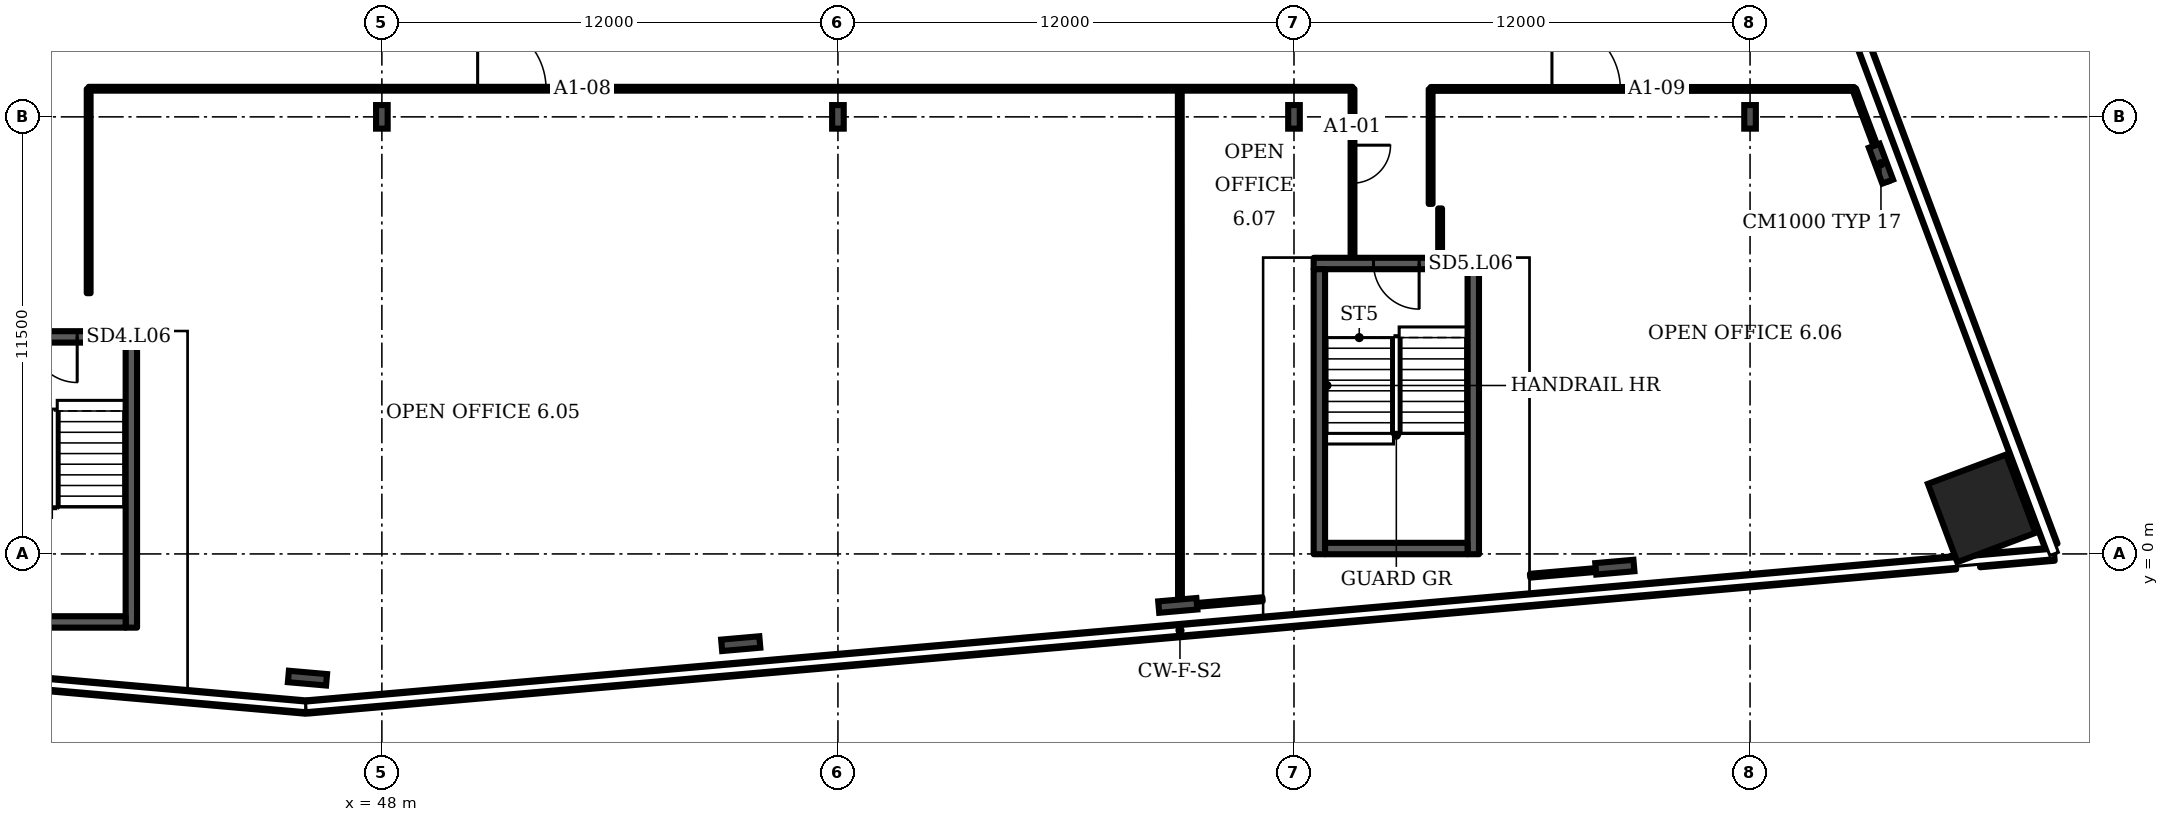
"""IFC4 building model, lengths in metres.
Left out: names, types, materials, properties, quantities, classifications, styles, units other than length and angle.
Written with IfcOpenShell. Run it as: python <this file> out.ifc"""

import sys

from ifc_helpers import new_model, si_unit, direction, frame, frame_2d, origin, origin_2d, place, context, subcontext, project, spatial, rectangle, i_section, extrude, element, fill, save


model = new_model("IFC4")
c1 = context("Model", 3, precision=1e-05, world=origin(), true_north=direction((0.0, 1.0)))
c2 = subcontext(c1, "Body", "Model", "MODEL_VIEW")
j1 = project(units=[si_unit("LENGTHUNIT", "METRE"), si_unit("PLANEANGLEUNIT", "RADIAN")], contexts=[c1])
p1 = place(None, origin())
s1 = spatial("IfcSite", under=j1, at=p1, CompositionType="ELEMENT")
p2 = place(p1, origin())
s2 = spatial("IfcBuilding", under=s1, at=p2, CompositionType="ELEMENT")
p3 = place(p2, frame((0.0, 0.0, 41.5)))
s3 = spatial("IfcBuildingStorey", under=s2, at=p3, CompositionType="ELEMENT", Elevation=41.5)
p4 = place(p3, frame((90.096, 1.2, 0.0), z_axis=(0.0, 0.0, 1.0), x_axis=(-0.351123, 0.936328, 0.0)))
e1 = element("IfcColumn", 1, at=p4, inside=s3, PredefinedType="COLUMN", context=c2, shape_type="SweptSolid", body=[
    extrude(rectangle(XDim=2.2, YDim=2.2, at=origin_2d()), origin(), (0.0, 0.0, 1.0), 3.6),
])
for number, where, z_axis, x_axis in (
    (2, (46.042, -3.268, 0.0), (0.0, 0.0, 1.0), (-0.087, -0.996, 0.0)),
    (3, (57.442, -2.361, 0.0), (0.0, 0.0, 1.0), (0.087, -0.996, 0.0)),
    (4, (68.942, -1.355, 0.0), (0.0, 0.0, 1.0), (0.087, -0.996, 0.0)),
    (5, (80.442, -0.349, 0.0), (0.0, 0.0, 1.0), (0.087, -0.996, 0.0)),
    (6, (87.445, 10.268, 0.0), (0.0, 0.0, 1.0), (0.936, 0.351, 0.0)),
):
    element("IfcColumn", number, at=place(p3, frame(where, z_axis=z_axis, x_axis=x_axis)), inside=s3, PredefinedType="COLUMN", context=c2, shape_type="SweptSolid", body=[
        extrude(i_section(OverallWidth=0.302, OverallDepth=1.008, WebThickness=0.021, FlangeThickness=0.04, FilletRadius=0.03, at=origin_2d()), origin(), (0.0, 0.0, 1.0), 3.6),
    ])
for number, where, z_axis, x_axis in (
    (7, (48.0, 11.5, 0.0), (0.0, 0.0, 1.0), (1.0, 0.0, 0.0)),
    (8, (60.0, 11.5, 0.0), (0.0, 0.0, 1.0), (1.0, 0.0, 0.0)),
    (9, (72.0, 11.5, 0.0), (0.0, 0.0, 1.0), (1.0, 0.0, 0.0)),
    (10, (84.0, 11.5, 0.0), (0.0, 0.0, 1.0), (1.0, 0.0, 0.0)),
):
    element("IfcColumn", number, at=place(p3, frame(where, z_axis=z_axis, x_axis=x_axis)), inside=s3, PredefinedType="COLUMN", context=c2, shape_type="SweptSolid", body=[
        extrude(i_section(OverallWidth=0.305, OverallDepth=0.62, WebThickness=0.021, FlangeThickness=0.04, FilletRadius=0.027, at=origin_2d()), origin(), (0.0, 0.0, 1.0), 3.6),
    ])
p5 = place(p3, frame((5.835, -0.516, 0.0), z_axis=(0.0, 0.0, 1.0), x_axis=(0.996195, -0.087152, 0.0)))
e11 = element("IfcWall", 11, at=p5, inside=s3, PredefinedType="SOLIDWALL", context=c2, shape_type="SweptSolid", body=[
    extrude(rectangle(XDim=40.333, YDim=0.35, at=frame_2d((20.167, 0.0))), origin(), (0.0, 0.0, 1.0), 1.0),
])
p6 = place(p3, frame((46.045, -4.026, 0.0), z_axis=(0.0, 0.0, 1.0), x_axis=(0.996198, 0.08716, 0.0)))
e12 = element("IfcWall", 12, at=p6, inside=s3, PredefinedType="SOLIDWALL", context=c2, shape_type="SweptSolid", body=[
    extrude(rectangle(XDim=43.529, YDim=0.35, at=frame_2d((21.764, 0.0))), origin(), (0.0, 0.0, 1.0), 1.0),
])
p7 = place(p3, frame((90.039, -0.177, 0.0), z_axis=(0.0, 0.0, 1.0), x_axis=(0.996193, 0.08717, 0.0)))
e13 = element("IfcWall", 13, at=p7, inside=s3, PredefinedType="SOLIDWALL", context=c2, shape_type="SweptSolid", body=[
    extrude(rectangle(XDim=1.969, YDim=0.35, at=frame_2d((0.984, 0.0))), origin(), (0.0, 0.0, 1.0), 1.0),
])
p8 = place(p3, frame((91.926, 0.211, 0.0), z_axis=(0.0, 0.0, 1.0), x_axis=(-0.351119, 0.93633, 0.0)))
e14 = element("IfcWall", 14, at=p8, inside=s3, PredefinedType="SOLIDWALL", context=c2, shape_type="SweptSolid", body=[
    extrude(rectangle(XDim=44.757, YDim=0.35, at=frame_2d((22.378, 0.0))), origin(), (0.0, 0.0, 1.0), 1.0),
])
p9 = place(p3, frame((37.208, 5.711, 0.0), z_axis=(0.0, 0.0, 1.0), x_axis=(1.0, 0.0, 0.0)))
e15 = element("IfcWall", 15, at=p9, inside=s3, PredefinedType="SHEAR", context=c2, shape_type="SweptSolid", body=[
    extrude(rectangle(XDim=4.35, YDim=0.3, at=frame_2d((2.175, 0.0))), origin(), (0.0, 0.0, 1.0), 3.2),
])
p10 = place(p9, frame((1.575, 0.0, 0.0)))
e16 = element("IfcOpeningElement", 16, at=p10, cuts=e15, PredefinedType="OPENING", context=c2, shape_type="SweptSolid", body=[
    extrude(rectangle(XDim=1.2, YDim=2.1, at=frame_2d((0.6, 1.05))), frame((0.0, 0.16, 0.0), z_axis=(0.0, -1.0, 0.0), x_axis=(1.0, 0.0, 0.0)), (0.0, 0.0, 1.0), 0.32),
])
p11 = place(p3, frame((72.518, 7.642, 0.0), z_axis=(0.0, 0.0, 1.0), x_axis=(1.0, 0.0, 0.0)))
e17 = element("IfcWall", 17, at=p11, inside=s3, PredefinedType="SHEAR", context=c2, shape_type="SweptSolid", body=[
    extrude(rectangle(XDim=4.35, YDim=0.3, at=frame_2d((2.175, 0.0))), origin(), (0.0, 0.0, 1.0), 3.2),
])
p12 = place(p11, frame((1.575, 0.0, 0.0)))
e18 = element("IfcOpeningElement", 18, at=p12, cuts=e17, PredefinedType="OPENING", context=c2, shape_type="SweptSolid", body=[
    extrude(rectangle(XDim=1.2, YDim=2.1, at=frame_2d((0.6, 1.05))), frame((0.0, 0.16, 0.0), z_axis=(0.0, -1.0, 0.0), x_axis=(1.0, 0.0, 0.0)), (0.0, 0.0, 1.0), 0.32),
])
p13 = place(p3, frame((40.285, 6.861, 0.0), z_axis=(0.0, 0.0, 1.0), x_axis=(0.0, 1.0, 0.0)))
e19 = element("IfcWall", 19, at=p13, inside=s3, PredefinedType="PARTITIONING", context=c2, shape_type="SweptSolid", body=[
    extrude(rectangle(XDim=5.375, YDim=0.1, at=frame_2d((2.687, 0.0))), origin(), (0.0, 0.0, 1.0), 3.2),
])
p14 = place(p3, frame((40.285, 12.24, 0.0), z_axis=(0.0, 0.0, 1.0), x_axis=(1.0, 0.0, 0.0)))
e20 = element("IfcWall", 20, at=p14, inside=s3, PredefinedType="PARTITIONING", context=c2, shape_type="SweptSolid", body=[
    extrude(rectangle(XDim=33.255, YDim=0.1, at=frame_2d((16.627, 0.0))), origin(), (0.0, 0.0, 1.0), 3.2),
])
p15 = place(p14, frame((10.235, 0.0, 0.0)))
e21 = element("IfcOpeningElement", 21, at=p15, cuts=e20, PredefinedType="OPENING", context=c2, shape_type="SweptSolid", body=[
    extrude(rectangle(XDim=1.8, YDim=2.1, at=frame_2d((0.9, 1.05))), frame((0.0, 0.06, 0.0), z_axis=(0.0, -1.0, 0.0), x_axis=(1.0, 0.0, 0.0)), (0.0, 0.0, 1.0), 0.12),
])
p16 = place(p3, frame((69.0, -1.38, 0.0), z_axis=(0.0, 0.0, 1.0), x_axis=(-0.000359, 1.000002, 0.0)))
e22 = element("IfcWall", 22, at=p16, inside=s3, PredefinedType="PARTITIONING", context=c2, shape_type="SweptSolid", body=[
    extrude(rectangle(XDim=13.615, YDim=0.1, at=frame_2d((6.808, 0.0))), origin(), (0.0, 0.0, 1.0), 3.2),
])
p17 = place(p3, frame((69.0, -1.38, 0.0), z_axis=(0.0, 0.0, 1.0), x_axis=(0.996261, 0.086427, 0.0)))
e23 = element("IfcWall", 23, at=p17, inside=s3, PredefinedType="PARTITIONING", context=c2, shape_type="SweptSolid", body=[
    extrude(rectangle(XDim=2.181, YDim=0.1, at=frame_2d((1.09, 0.0))), origin(), (0.0, 0.0, 1.0), 2.58),
])
p18 = place(p3, frame((73.54, 7.812, 0.0), z_axis=(0.0, 0.0, 1.0), x_axis=(0.0, 1.0, 0.0)))
e24 = element("IfcWall", 24, at=p18, inside=s3, PredefinedType="PARTITIONING", context=c2, shape_type="SweptSolid", body=[
    extrude(rectangle(XDim=4.423, YDim=0.1, at=frame_2d((2.211, 0.0))), origin(), (0.0, 0.0, 1.0), 3.2),
])
p19 = place(p18, frame((1.943, 0.0, 0.0)))
e25 = element("IfcOpeningElement", 25, at=p19, cuts=e24, PredefinedType="OPENING", context=c2, shape_type="SweptSolid", body=[
    extrude(rectangle(XDim=1.0, YDim=2.1, at=frame_2d((0.5, 1.05))), frame((0.0, 0.06, 0.0), z_axis=(0.0, -1.0, 0.0), x_axis=(1.0, 0.0, 0.0)), (0.0, 0.0, 1.0), 0.12),
])
p20 = place(p3, frame((75.595, 9.21, 0.0), z_axis=(0.0, 0.0, 1.0), x_axis=(0.0, 1.0, 0.0)))
e26 = element("IfcWall", 26, at=p20, inside=s3, PredefinedType="PARTITIONING", context=c2, shape_type="SweptSolid", body=[
    extrude(rectangle(XDim=3.02, YDim=0.1, at=frame_2d((1.51, 0.0))), origin(), (0.0, 0.0, 1.0), 3.2),
])
p21 = place(p3, frame((75.595, 12.235, 0.0), z_axis=(0.0, 0.0, 1.0), x_axis=(1.0, 0.0, 0.0)))
e27 = element("IfcWall", 27, at=p21, inside=s3, PredefinedType="PARTITIONING", context=c2, shape_type="SweptSolid", body=[
    extrude(rectangle(XDim=11.145, YDim=0.1, at=frame_2d((5.573, 0.0))), origin(), (0.0, 0.0, 1.0), 3.2),
])
p22 = place(p21, frame((3.192, 0.0, 0.0)))
e28 = element("IfcOpeningElement", 28, at=p22, cuts=e27, PredefinedType="OPENING", context=c2, shape_type="SweptSolid", body=[
    extrude(rectangle(XDim=1.8, YDim=2.1, at=frame_2d((0.9, 1.05))), frame((0.0, 0.06, 0.0), z_axis=(0.0, -1.0, 0.0), x_axis=(1.0, 0.0, 0.0)), (0.0, 0.0, 1.0), 0.12),
])
p23 = place(p3, frame((75.845, 7.812, 0.0), z_axis=(0.0, 0.0, 1.0), x_axis=(0.0, 1.0, 0.0)))
e29 = element("IfcWall", 29, at=p23, inside=s3, PredefinedType="PARTITIONING", context=c2, shape_type="SweptSolid", body=[
    extrude(rectangle(XDim=1.278, YDim=0.1, at=frame_2d((0.639, 0.0))), origin(), (0.0, 0.0, 1.0), 3.2),
])
p24 = place(p3, frame((78.212, -0.573, 0.0), z_axis=(0.0, 0.0, 1.0), x_axis=(0.996271, 0.08623, 0.0)))
e30 = element("IfcWall", 30, at=p24, inside=s3, PredefinedType="PARTITIONING", context=c2, shape_type="SweptSolid", body=[
    extrude(rectangle(XDim=2.296, YDim=0.1, at=frame_2d((1.148, 0.0))), origin(), (0.0, 0.0, 1.0), 2.58),
])
p25 = place(p3, frame((86.88, 11.855, 0.0), z_axis=(0.0, 0.0, 1.0), x_axis=(-0.34537, 0.938466, 0.0)))
e31 = element("IfcWall", 31, at=p25, inside=s3, PredefinedType="PARTITIONING", context=c2, shape_type="SweptSolid", body=[
    extrude(rectangle(XDim=0.405, YDim=0.1, at=frame_2d((0.203, 0.0))), origin(), (0.0, 0.0, 1.0), 2.58),
])
p26 = place(p3, frame((87.65, 9.81, 0.0), z_axis=(0.0, 0.0, 1.0), x_axis=(-0.352397, 0.935852, 0.0)))
e32 = element("IfcWall", 32, at=p26, inside=s3, PredefinedType="PARTITIONING", context=c2, shape_type="SweptSolid", body=[
    extrude(rectangle(XDim=2.185, YDim=0.1, at=frame_2d((1.093, 0.0))), origin(), (0.0, 0.0, 1.0), 2.58),
])
p27 = place(p3, frame((41.408, -1.939, 0.0), z_axis=(0.0, 0.0, 1.0), x_axis=(0.0, 1.0, 0.0)))
e33 = element("IfcWall", 33, at=p27, inside=s3, PredefinedType="SHEAR", context=c2, shape_type="SweptSolid", body=[
    extrude(rectangle(XDim=7.5, YDim=0.3, at=frame_2d((3.75, 0.0))), origin(), (0.0, 0.0, 1.0), 3.2),
])
p28 = place(p3, frame((37.508, -1.789, 0.0), z_axis=(0.0, 0.0, 1.0), x_axis=(1.0, 0.0, 0.0)))
e34 = element("IfcWall", 34, at=p28, inside=s3, PredefinedType="SHEAR", context=c2, shape_type="SweptSolid", body=[
    extrude(rectangle(XDim=3.75, YDim=0.3, at=frame_2d((1.875, 0.0))), origin(), (0.0, 0.0, 1.0), 3.2),
])
for number, where, z_axis, x_axis in (
    (35, (72.667, -0.008, 0.0), (0.0, 0.0, 1.0), (0.0, 1.0, 0.0)),
    (36, (76.718, -0.008, 0.0), (0.0, 0.0, 1.0), (0.0, 1.0, 0.0)),
):
    element("IfcWall", number, at=place(p3, frame(where, z_axis=z_axis, x_axis=x_axis)), inside=s3, PredefinedType="SHEAR", context=c2, shape_type="SweptSolid", body=[
        extrude(rectangle(XDim=7.5, YDim=0.3, at=frame_2d((3.75, 0.0))), origin(), (0.0, 0.0, 1.0), 3.2),
    ])
p29 = place(p3, frame((72.817, 0.142, 0.0), z_axis=(0.0, 0.0, 1.0), x_axis=(1.0, 0.0, 0.0)))
e37 = element("IfcWall", 37, at=p29, inside=s3, PredefinedType="SHEAR", context=c2, shape_type="SweptSolid", body=[
    extrude(rectangle(XDim=3.75, YDim=0.3, at=frame_2d((1.875, 0.0))), origin(), (0.0, 0.0, 1.0), 3.2),
])
p30 = place(p10, origin())
e38 = element("IfcDoor", 38, at=p30, inside=s3, OperationType="SINGLE_SWING_RIGHT", PredefinedType="DOOR", context=c2, shape_type="SweptSolid", body=[
    extrude(rectangle(XDim=1.2, YDim=2.1, at=frame_2d((0.6, 1.05))), frame((0.0, 0.025, 0.0), z_axis=(0.0, -1.0, 0.0), x_axis=(1.0, 0.0, 0.0)), (0.0, 0.0, 1.0), 0.05),
])
fill(e16, e38)
p31 = place(p12, origin())
e39 = element("IfcDoor", 39, at=p31, inside=s3, OperationType="SINGLE_SWING_RIGHT", PredefinedType="DOOR", context=c2, shape_type="SweptSolid", body=[
    extrude(rectangle(XDim=1.2, YDim=2.1, at=frame_2d((0.6, 1.05))), frame((0.0, 0.025, 0.0), z_axis=(0.0, -1.0, 0.0), x_axis=(1.0, 0.0, 0.0)), (0.0, 0.0, 1.0), 0.05),
])
fill(e18, e39)
p32 = place(p19, origin())
e40 = element("IfcDoor", 40, at=p32, inside=s3, OperationType="SINGLE_SWING_RIGHT", PredefinedType="DOOR", context=c2, shape_type="SweptSolid", body=[
    extrude(rectangle(XDim=1.0, YDim=2.1, at=frame_2d((0.5, 1.05))), frame((0.0, 0.025, 0.0), z_axis=(0.0, -1.0, 0.0), x_axis=(1.0, 0.0, 0.0)), (0.0, 0.0, 1.0), 0.05),
])
fill(e25, e40)
p33 = place(p15, origin())
e41 = element("IfcDoor", 41, at=p33, inside=s3, OperationType="DOUBLE_DOOR_SINGLE_SWING", PredefinedType="DOOR", context=c2, shape_type="SweptSolid", body=[
    extrude(rectangle(XDim=1.8, YDim=2.1, at=frame_2d((0.9, 1.05))), frame((0.0, 0.025, 0.0), z_axis=(0.0, -1.0, 0.0), x_axis=(1.0, 0.0, 0.0)), (0.0, 0.0, 1.0), 0.05),
])
fill(e21, e41)
p34 = place(p22, origin())
e42 = element("IfcDoor", 42, at=p34, inside=s3, OperationType="DOUBLE_DOOR_SINGLE_SWING", PredefinedType="DOOR", context=c2, shape_type="SweptSolid", body=[
    extrude(rectangle(XDim=1.8, YDim=2.1, at=frame_2d((0.9, 1.05))), frame((0.0, 0.025, 0.0), z_axis=(0.0, -1.0, 0.0), x_axis=(1.0, 0.0, 0.0)), (0.0, 0.0, 1.0), 0.05),
])
fill(e28, e42)
save(model, sys.argv[1])
